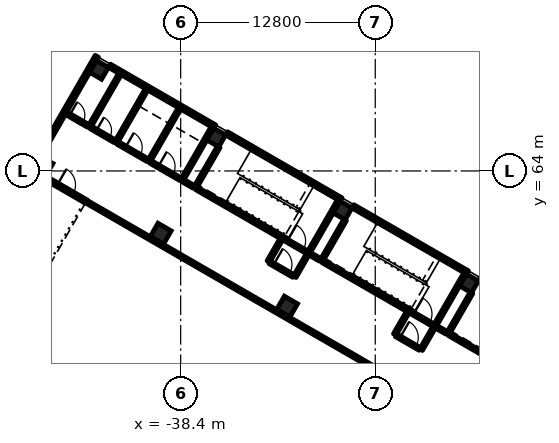
"""IFC4 building model, lengths in metres.
Left out: names, types, materials, properties, quantities, classifications, styles, units other than length and angle.
Written with IfcOpenShell. Run it as: python <this file> out.ifc"""

import sys

from ifc_helpers import new_model, si_unit, direction, frame, frame_2d, origin, origin_2d, place, context, subcontext, project, spatial, rectangle, extrude, element, fill, save


model = new_model("IFC4")
c1 = context("Model", 3, precision=1e-05, world=origin(), true_north=direction((0.0, 1.0)))
c2 = subcontext(c1, "Body", "Model", "MODEL_VIEW")
j1 = project(units=[si_unit("LENGTHUNIT", "METRE"), si_unit("PLANEANGLEUNIT", "RADIAN")], contexts=[c1])
p1 = place(None, origin())
s1 = spatial("IfcSite", under=j1, at=p1, CompositionType="ELEMENT")
p2 = place(p1, origin())
s2 = spatial("IfcBuilding", under=s1, at=p2, CompositionType="ELEMENT")
p3 = place(p2, frame((0.0, 0.0, 6.0)))
s3 = spatial("IfcBuildingStorey", under=s2, at=p3, CompositionType="ELEMENT", Elevation=6.0)
for number, where, z_axis, x_axis in (
    (1, (-19.432, 56.599, 0.0), (0.0, 0.0, 1.0), (-0.5, -0.866, 0.0)),
    (2, (-27.746, 61.399, 0.0), (0.0, 0.0, 1.0), (-0.5, -0.866, 0.0)),
    (3, (-36.06, 66.199, 0.0), (0.0, 0.0, 1.0), (-0.5, -0.866, 0.0)),
    (4, (-43.767, 70.649, 0.0), (0.0, 0.0, 1.0), (-0.5, -0.866, 0.0)),
):
    element("IfcColumn", number, at=place(p3, frame(where, z_axis=z_axis, x_axis=x_axis)), inside=s3, PredefinedType="COLUMN", context=c2, shape_type="SweptSolid", body=[
        extrude(rectangle(XDim=0.9, YDim=0.9, at=origin_2d()), origin(), (0.0, 0.0, 1.0), 5.4),
    ])
for number, where, z_axis, x_axis in (
    (5, (-31.396, 55.077, 0.0), (0.0, 0.0, 1.0), (-0.5, -0.866, 0.0)),
    (6, (-39.71, 59.877, 0.0), (0.0, 0.0, 1.0), (-0.5, -0.866, 0.0)),
):
    element("IfcColumn", number, at=place(p3, frame(where, z_axis=z_axis, x_axis=x_axis)), inside=s3, PredefinedType="COLUMN", context=c2, shape_type="SweptSolid", body=[
        extrude(rectangle(XDim=1.0, YDim=1.0, at=origin_2d()), origin(), (0.0, 0.0, 1.0), 5.4),
    ])
p4 = place(p3, frame((-47.417, 64.327, 0.0), z_axis=(0.0, 0.0, 1.0), x_axis=(-0.5, -0.866025403784, 0.0)))
e7 = element("IfcColumn", 7, at=p4, inside=s3, PredefinedType="COLUMN", context=c2, shape_type="SweptSolid", body=[
    extrude(rectangle(XDim=0.9, YDim=0.9, at=origin_2d()), origin(), (0.0, 0.0, 1.0), 5.4),
])
p5 = place(p3, frame((-49.071, 62.612, 0.0), z_axis=(0.0, 0.0, 1.0), x_axis=(0.500001855621, 0.866024332438, 0.0)))
e8 = element("IfcWall", 8, at=p5, inside=s3, PredefinedType="SOLIDWALL", context=c2, shape_type="SweptSolid", body=[
    extrude(rectangle(XDim=10.312, YDim=0.25, at=frame_2d((5.156, 0.0))), origin(), (0.0, 0.0, 1.0), 5.1),
])
p6 = place(p3, frame((-18.755, 56.872, 0.0), z_axis=(0.0, 0.0, 1.0), x_axis=(0.866027159341, -0.499996959274, 0.0)))
e9 = element("IfcWall", 9, at=p6, inside=s3, PredefinedType="SOLIDWALL", context=c2, shape_type="SweptSolid", body=[
    extrude(rectangle(XDim=11.625, YDim=0.25, at=frame_2d((5.812, 0.0))), origin(), (0.0, 0.0, 1.0), 5.1),
])
p7 = place(p3, frame((-27.069, 61.672, 0.0), z_axis=(0.0, 0.0, 1.0), x_axis=(0.866021068297, -0.500007509209, 0.0)))
e10 = element("IfcWall", 10, at=p7, inside=s3, PredefinedType="SOLIDWALL", context=c2, shape_type="SweptSolid", body=[
    extrude(rectangle(XDim=8.6, YDim=0.25, at=frame_2d((4.3, 0.0))), origin(), (0.0, 0.0, 1.0), 5.1),
])
p8 = place(p3, frame((-35.383, 66.472, 0.0), z_axis=(0.0, 0.0, 1.0), x_axis=(0.866028165386, -0.499995216735, 0.0)))
e11 = element("IfcWall", 11, at=p8, inside=s3, PredefinedType="SOLIDWALL", context=c2, shape_type="SweptSolid", body=[
    extrude(rectangle(XDim=8.6, YDim=0.25, at=frame_2d((4.3, 0.0))), origin(), (0.0, 0.0, 1.0), 5.1),
])
p9 = place(p3, frame((-43.09, 70.922, 0.0), z_axis=(0.0, 0.0, 1.0), x_axis=(0.866026562566, -0.499997992926, 0.0)))
e12 = element("IfcWall", 12, at=p9, inside=s3, PredefinedType="SOLIDWALL", context=c2, shape_type="SweptSolid", body=[
    extrude(rectangle(XDim=7.9, YDim=0.25, at=frame_2d((3.95, 0.0))), origin(), (0.0, 0.0, 1.0), 5.1),
])
p10 = place(p3, frame((-19.621, 57.372, 0.0), z_axis=(0.0, 0.0, 1.0), x_axis=(0.867038199201, -0.4982416694, 0.0)))
e13 = element("IfcWall", 13, at=p10, inside=s3, PredefinedType="SOLIDWALL", context=c2, shape_type="SweptSolid", body=[
    extrude(rectangle(XDim=0.1, YDim=0.25, at=frame_2d((0.05, 0.0))), origin(), (0.0, 0.0, 1.0), 5.1),
])
for number, where, z_axis, x_axis in (
    (14, (-27.935, 62.172, 0.0), (0.0, 0.0, 1.0), (0.866, -0.5, 0.0)),
    (15, (-36.249, 66.972, 0.0), (0.0, 0.0, 1.0), (0.866, -0.5, 0.0)),
):
    element("IfcWall", number, at=place(p3, frame(where, z_axis=z_axis, x_axis=x_axis)), inside=s3, PredefinedType="SOLIDWALL", context=c2, shape_type="SweptSolid", body=[
        extrude(rectangle(XDim=0.1, YDim=0.25, at=frame_2d((0.05, 0.0))), origin(), (0.0, 0.0, 1.0), 5.1),
    ])
p11 = place(p3, frame((-19.267, 55.984, 0.0), z_axis=(0.0, 0.0, 1.0), x_axis=(-0.49999285859, -0.86602952684, 0.0)))
e16 = element("IfcWall", 16, at=p11, inside=s3, PredefinedType="SOLIDWALL", context=c2, shape_type="SweptSolid", body=[
    extrude(rectangle(XDim=3.1, YDim=0.2, at=frame_2d((1.55, 0.0))), origin(), (0.0, 0.0, 1.0), 5.1),
])
p12 = place(p3, frame((-19.683, 57.263, 0.0), z_axis=(0.0, 0.0, 1.0), x_axis=(-0.49999894854, -0.866026010844, 0.0)))
e17 = element("IfcWall", 17, at=p12, inside=s3, PredefinedType="SOLIDWALL", context=c2, shape_type="SweptSolid", body=[
    extrude(rectangle(XDim=4.0, YDim=0.2, at=frame_2d((2.0, 0.0))), origin(), (0.0, 0.0, 1.0), 5.1),
])
p13 = place(p3, frame((-27.581, 60.784, 0.0), z_axis=(0.0, 0.0, 1.0), x_axis=(-0.49999285859, -0.86602952684, 0.0)))
e18 = element("IfcWall", 18, at=p13, inside=s3, PredefinedType="SOLIDWALL", context=c2, shape_type="SweptSolid", body=[
    extrude(rectangle(XDim=3.1, YDim=0.2, at=frame_2d((1.55, 0.0))), origin(), (0.0, 0.0, 1.0), 5.1),
])
p14 = place(p3, frame((-27.997, 62.063, 0.0), z_axis=(0.0, 0.0, 1.0), x_axis=(-0.49999894854, -0.866026010844, 0.0)))
e19 = element("IfcWall", 19, at=p14, inside=s3, PredefinedType="SOLIDWALL", context=c2, shape_type="SweptSolid", body=[
    extrude(rectangle(XDim=4.0, YDim=0.2, at=frame_2d((2.0, 0.0))), origin(), (0.0, 0.0, 1.0), 5.1),
])
p15 = place(p3, frame((-35.895, 65.584, 0.0), z_axis=(0.0, 0.0, 1.0), x_axis=(-0.500026960575, -0.86600983753, 0.0)))
e20 = element("IfcWall", 20, at=p15, inside=s3, PredefinedType="SOLIDWALL", context=c2, shape_type="SweptSolid", body=[
    extrude(rectangle(XDim=3.1, YDim=0.2, at=frame_2d((1.55, 0.0))), origin(), (0.0, 0.0, 1.0), 5.1),
])
p16 = place(p3, frame((-14.972, 49.924, 0.0), z_axis=(0.0, 0.0, 1.0), x_axis=(-0.86601134256, 0.500024353964, 0.0)))
e21 = element("IfcWall", 21, at=p16, inside=s3, PredefinedType="SOLIDWALL", context=c2, shape_type="SweptSolid", body=[
    extrude(rectangle(XDim=6.65, YDim=0.2, at=frame_2d((3.325, 0.0))), origin(), (0.0, 0.0, 1.0), 5.1),
])
p17 = place(p3, frame((-23.285, 54.724, 0.0), z_axis=(0.0, 0.0, 1.0), x_axis=(0.866002029911, -0.500040482552, 0.0)))
e22 = element("IfcWall", 22, at=p17, inside=s3, PredefinedType="SOLIDWALL", context=c2, shape_type="SweptSolid", body=[
    extrude(rectangle(XDim=1.75, YDim=0.2, at=frame_2d((0.875, 0.0))), origin(), (0.0, 0.0, 1.0), 5.1),
])
p18 = place(p17, frame((0.25, 0.0, 0.0)))
e23 = element("IfcOpeningElement", 23, at=p18, cuts=e22, PredefinedType="OPENING", context=c2, shape_type="SweptSolid", body=[
    extrude(rectangle(XDim=1.2, YDim=2.1, at=frame_2d((0.6, 1.05))), frame((0.0, 0.11, 0.0), z_axis=(0.0, -1.0, 0.0), x_axis=(1.0, 0.0, 0.0)), (0.0, 0.0, 1.0), 0.22),
])
p19 = place(p3, frame((-23.285, 54.724, 0.0), z_axis=(0.0, 0.0, 1.0), x_axis=(-0.866027239912, 0.49999681972, 0.0)))
e24 = element("IfcWall", 24, at=p19, inside=s3, PredefinedType="SOLIDWALL", context=c2, shape_type="SweptSolid", body=[
    extrude(rectangle(XDim=6.65, YDim=0.2, at=frame_2d((3.325, 0.0))), origin(), (0.0, 0.0, 1.0), 5.1),
])
p20 = place(p3, frame((-31.599, 59.524, 0.0), z_axis=(0.0, 0.0, 1.0), x_axis=(0.866036909293, -0.499980071345, 0.0)))
e25 = element("IfcWall", 25, at=p20, inside=s3, PredefinedType="SOLIDWALL", context=c2, shape_type="SweptSolid", body=[
    extrude(rectangle(XDim=1.75, YDim=0.2, at=frame_2d((0.875, 0.0))), origin(), (0.0, 0.0, 1.0), 5.1),
])
p21 = place(p20, frame((0.25, 0.0, 0.0)))
e26 = element("IfcOpeningElement", 26, at=p21, cuts=e25, PredefinedType="OPENING", context=c2, shape_type="SweptSolid", body=[
    extrude(rectangle(XDim=1.2, YDim=2.1, at=frame_2d((0.6, 1.05))), frame((0.0, 0.11, 0.0), z_axis=(0.0, -1.0, 0.0), x_axis=(1.0, 0.0, 0.0)), (0.0, 0.0, 1.0), 0.22),
])
p22 = place(p3, frame((-31.599, 59.524, 0.0), z_axis=(0.0, 0.0, 1.0), x_axis=(-0.866027239912, 0.49999681972, 0.0)))
e27 = element("IfcWall", 27, at=p22, inside=s3, PredefinedType="SOLIDWALL", context=c2, shape_type="SweptSolid", body=[
    extrude(rectangle(XDim=6.65, YDim=0.2, at=frame_2d((3.325, 0.0))), origin(), (0.0, 0.0, 1.0), 5.1),
])
for number, where, z_axis, x_axis in (
    (28, (-36.311, 66.864, 0.0), (0.0, 0.0, 1.0), (-0.5, -0.866, 0.0)),
    (29, (-38.476, 68.114, 0.0), (0.0, 0.0, 1.0), (-0.5, -0.866, 0.0)),
    (30, (-40.641, 69.364, 0.0), (0.0, 0.0, 1.0), (-0.5, -0.866, 0.0)),
):
    element("IfcWall", number, at=place(p3, frame(where, z_axis=z_axis, x_axis=x_axis)), inside=s3, PredefinedType="SOLIDWALL", context=c2, shape_type="SweptSolid", body=[
        extrude(rectangle(XDim=4.0, YDim=0.2, at=frame_2d((2.0, 0.0))), origin(), (0.0, 0.0, 1.0), 5.1),
    ])
p23 = place(p3, frame((-40.389, 64.599, 0.0), z_axis=(0.0, 0.0, 1.0), x_axis=(0.86602648383, -0.499998129301, 0.0)))
e31 = element("IfcWall", 31, at=p23, inside=s3, PredefinedType="SOLIDWALL", context=c2, shape_type="SweptSolid", body=[
    extrude(rectangle(XDim=2.3, YDim=0.2, at=frame_2d((1.15, 0.0))), origin(), (0.0, 0.0, 1.0), 5.1),
])
p24 = place(p23, frame((0.6, 0.0, 0.0)))
e32 = element("IfcOpeningElement", 32, at=p24, cuts=e31, PredefinedType="OPENING", context=c2, shape_type="SweptSolid", body=[
    extrude(rectangle(XDim=1.1, YDim=2.1, at=frame_2d((0.55, 1.05))), frame((0.0, 0.11, 0.0), z_axis=(0.0, -1.0, 0.0), x_axis=(1.0, 0.0, 0.0)), (0.0, 0.0, 1.0), 0.22),
])
p25 = place(p3, frame((-42.554, 65.849, 0.0), z_axis=(0.0, 0.0, 1.0), x_axis=(0.86602648383, -0.499998129301, 0.0)))
e33 = element("IfcWall", 33, at=p25, inside=s3, PredefinedType="SOLIDWALL", context=c2, shape_type="SweptSolid", body=[
    extrude(rectangle(XDim=2.3, YDim=0.2, at=frame_2d((1.15, 0.0))), origin(), (0.0, 0.0, 1.0), 5.1),
])
p26 = place(p25, frame((0.6, 0.0, 0.0)))
e34 = element("IfcOpeningElement", 34, at=p26, cuts=e33, PredefinedType="OPENING", context=c2, shape_type="SweptSolid", body=[
    extrude(rectangle(XDim=1.1, YDim=2.1, at=frame_2d((0.55, 1.05))), frame((0.0, 0.11, 0.0), z_axis=(0.0, -1.0, 0.0), x_axis=(1.0, 0.0, 0.0)), (0.0, 0.0, 1.0), 0.22),
])
p27 = place(p3, frame((-21.733, 53.713, 0.0), z_axis=(0.0, 0.0, 1.0), x_axis=(-0.499892348375, -0.866087547558, 0.0)))
e35 = element("IfcWall", 35, at=p27, inside=s3, PredefinedType="PARTITIONING", context=c2, shape_type="SweptSolid", body=[
    extrude(rectangle(XDim=1.7, YDim=0.2, at=frame_2d((0.85, 0.0))), origin(), (0.0, 0.0, 1.0), 4.5),
])
p28 = place(p3, frame((-23.465, 54.713, 0.0), z_axis=(0.0, 0.0, 1.0), x_axis=(-0.500000056704, -0.866025371046, 0.0)))
e36 = element("IfcWall", 36, at=p28, inside=s3, PredefinedType="PARTITIONING", context=c2, shape_type="SweptSolid", body=[
    extrude(rectangle(XDim=1.7, YDim=0.2, at=frame_2d((0.85, 0.0))), origin(), (0.0, 0.0, 1.0), 4.5),
])
for number, where, z_axis, x_axis in (
    (37, (-30.047, 58.513, 0.0), (0.0, 0.0, 1.0), (-0.5, -0.866, 0.0)),
    (38, (-31.779, 59.513, 0.0), (0.0, 0.0, 1.0), (-0.5, -0.866, 0.0)),
):
    element("IfcWall", number, at=place(p3, frame(where, z_axis=z_axis, x_axis=x_axis)), inside=s3, PredefinedType="PARTITIONING", context=c2, shape_type="SweptSolid", body=[
        extrude(rectangle(XDim=1.7, YDim=0.2, at=frame_2d((0.85, 0.0))), origin(), (0.0, 0.0, 1.0), 4.5),
    ])
p29 = place(p3, frame((-24.229, 53.19, 0.0), z_axis=(0.0, 0.0, 1.0), x_axis=(0.866047807691, -0.499961193289, 0.0)))
e39 = element("IfcWall", 39, at=p29, inside=s3, PredefinedType="PARTITIONING", context=c2, shape_type="SweptSolid", body=[
    extrude(rectangle(XDim=1.8, YDim=0.2, at=frame_2d((0.9, 0.0))), origin(), (0.0, 0.0, 1.0), 4.5),
])
p30 = place(p29, frame((0.3, 0.0, 0.0)))
e40 = element("IfcOpeningElement", 40, at=p30, cuts=e39, PredefinedType="OPENING", context=c2, shape_type="SweptSolid", body=[
    extrude(rectangle(XDim=1.2, YDim=2.1, at=frame_2d((0.6, 1.05))), frame((0.0, 0.11, 0.0), z_axis=(0.0, -1.0, 0.0), x_axis=(1.0, 0.0, 0.0)), (0.0, 0.0, 1.0), 0.22),
])
p31 = place(p3, frame((-32.542, 57.99, 0.0), z_axis=(0.0, 0.0, 1.0), x_axis=(0.866047807691, -0.499961193289, 0.0)))
e41 = element("IfcWall", 41, at=p31, inside=s3, PredefinedType="PARTITIONING", context=c2, shape_type="SweptSolid", body=[
    extrude(rectangle(XDim=1.8, YDim=0.2, at=frame_2d((0.9, 0.0))), origin(), (0.0, 0.0, 1.0), 4.5),
])
p32 = place(p31, frame((0.3, 0.0, 0.0)))
e42 = element("IfcOpeningElement", 42, at=p32, cuts=e41, PredefinedType="OPENING", context=c2, shape_type="SweptSolid", body=[
    extrude(rectangle(XDim=1.2, YDim=2.1, at=frame_2d((0.6, 1.05))), frame((0.0, 0.11, 0.0), z_axis=(0.0, -1.0, 0.0), x_axis=(1.0, 0.0, 0.0)), (0.0, 0.0, 1.0), 0.22),
])
p33 = place(p3, frame((-46.734, 63.21, 0.0), z_axis=(0.0, 0.0, 1.0), x_axis=(0.866057815567, -0.499943856944, 0.0)))
e43 = element("IfcWall", 43, at=p33, inside=s3, PredefinedType="SOLIDWALL", context=c2, shape_type="SweptSolid", body=[
    extrude(rectangle(XDim=2.45, YDim=0.25, at=frame_2d((1.225, 0.0))), origin(), (0.0, 0.0, 1.0), 4.5),
])
p34 = place(p33, frame((0.25, 0.0, 0.0)))
e44 = element("IfcOpeningElement", 44, at=p34, cuts=e43, PredefinedType="OPENING", context=c2, shape_type="SweptSolid", body=[
    extrude(rectangle(XDim=1.2, YDim=2.1, at=frame_2d((0.6, 1.05))), frame((0.0, 0.135, 0.0), z_axis=(0.0, -1.0, 0.0), x_axis=(1.0, 0.0, 0.0)), (0.0, 0.0, 1.0), 0.27),
])
p35 = place(p3, frame((-46.734, 63.21, 0.0), z_axis=(0.0, 0.0, 1.0), x_axis=(-0.865989903783, 0.500061482766, 0.0)))
e45 = element("IfcWall", 45, at=p35, inside=s3, PredefinedType="SOLIDWALL", context=c2, shape_type="SweptSolid", body=[
    extrude(rectangle(XDim=1.6, YDim=0.25, at=frame_2d((0.8, 0.0))), origin(), (0.0, 0.0, 1.0), 4.5),
])
p36 = place(p3, frame((-42.395, 70.376, 0.0), z_axis=(0.0, 0.0, 1.0), x_axis=(-0.49999894854, -0.866026010844, 0.0)))
e46 = element("IfcWall", 46, at=p36, inside=s3, PredefinedType="PARTITIONING", context=c2, shape_type="SweptSolid", body=[
    extrude(rectangle(XDim=4.0, YDim=0.2, at=frame_2d((2.0, 0.0))), origin(), (0.0, 0.0, 1.0), 4.5),
])
p37 = place(p3, frame((-44.308, 66.862, 0.0), z_axis=(0.0, 0.0, 1.0), x_axis=(0.866036312054, -0.499981105847, 0.0)))
e47 = element("IfcWall", 47, at=p37, inside=s3, PredefinedType="PARTITIONING", context=c2, shape_type="SweptSolid", body=[
    extrude(rectangle(XDim=1.825, YDim=0.2, at=frame_2d((0.912, 0.0))), origin(), (0.0, 0.0, 1.0), 4.5),
])
p38 = place(p37, frame((0.413, 0.0, 0.0)))
e48 = element("IfcOpeningElement", 48, at=p38, cuts=e47, PredefinedType="OPENING", context=c2, shape_type="SweptSolid", body=[
    extrude(rectangle(XDim=1.0, YDim=2.1, at=frame_2d((0.5, 1.05))), frame((0.0, 0.11, 0.0), z_axis=(0.0, -1.0, 0.0), x_axis=(1.0, 0.0, 0.0)), (0.0, 0.0, 1.0), 0.22),
])
p39 = place(p3, frame((-45.932, 67.799, 0.0), z_axis=(0.0, 0.0, 1.0), x_axis=(0.866027799164, -0.499995851058, 0.0)))
e49 = element("IfcWall", 49, at=p39, inside=s3, PredefinedType="PARTITIONING", context=c2, shape_type="SweptSolid", body=[
    extrude(rectangle(XDim=1.675, YDim=0.2, at=frame_2d((0.837, 0.0))), origin(), (0.0, 0.0, 1.0), 4.5),
])
p40 = place(p39, frame((0.262, 0.0, 0.0)))
e50 = element("IfcOpeningElement", 50, at=p40, cuts=e49, PredefinedType="OPENING", context=c2, shape_type="SweptSolid", body=[
    extrude(rectangle(XDim=1.0, YDim=2.1, at=frame_2d((0.5, 1.05))), frame((0.0, 0.11, 0.0), z_axis=(0.0, -1.0, 0.0), x_axis=(1.0, 0.0, 0.0)), (0.0, 0.0, 1.0), 0.22),
])
p41 = place(p3, frame((-20.904, 53.349, 0.0), z_axis=(0.0, 0.0, 1.0), x_axis=(-0.865961984968, 0.500109828528, 0.0)))
e51 = element("IfcWall", 51, at=p41, inside=s3, PredefinedType="PARTITIONING", context=c2, shape_type="SweptSolid", body=[
    extrude(rectangle(XDim=0.8, YDim=0.2, at=frame_2d((0.4, 0.0))), origin(), (0.0, 0.0, 1.0), 4.5),
])
p42 = place(p3, frame((-29.218, 58.149, 0.0), z_axis=(0.0, 0.0, 1.0), x_axis=(-0.866017831539, 0.500013115284, 0.0)))
e52 = element("IfcWall", 52, at=p42, inside=s3, PredefinedType="PARTITIONING", context=c2, shape_type="SweptSolid", body=[
    extrude(rectangle(XDim=0.8, YDim=0.2, at=frame_2d((0.4, 0.0))), origin(), (0.0, 0.0, 1.0), 4.5),
])
p43 = place(p3, frame((-37.531, 62.949, 0.0), z_axis=(0.0, 0.0, 1.0), x_axis=(-0.866094119867, 0.499880961361, 0.0)))
e53 = element("IfcWall", 53, at=p43, inside=s3, PredefinedType="PARTITIONING", context=c2, shape_type="SweptSolid", body=[
    extrude(rectangle(XDim=0.8, YDim=0.2, at=frame_2d((0.4, 0.0))), origin(), (0.0, 0.0, 1.0), 4.5),
])
p44 = place(p3, frame((-10.491, 42.285, 0.0), z_axis=(0.0, 0.0, 1.0), x_axis=(-0.866022857395, 0.50000441045, 0.0)))
e54 = element("IfcWall", 54, at=p44, inside=s3, PredefinedType="PARTITIONING", context=c2, shape_type="SweptSolid", body=[
    extrude(rectangle(XDim=39.4, YDim=0.2, at=frame_2d((19.7, 0.0))), origin(), (0.0, 0.0, 1.0), 4.5),
])
p45 = place(p18, origin())
e55 = element("IfcDoor", 55, at=p45, inside=s3, OperationType="SINGLE_SWING_LEFT", PredefinedType="DOOR", context=c2, shape_type="SweptSolid", body=[
    extrude(rectangle(XDim=1.2, YDim=2.1, at=frame_2d((0.6, 1.05))), frame((0.0, 0.025, 0.0), z_axis=(0.0, -1.0, 0.0), x_axis=(1.0, 0.0, 0.0)), (0.0, 0.0, 1.0), 0.05),
])
fill(e23, e55)
p46 = place(p21, origin())
e56 = element("IfcDoor", 56, at=p46, inside=s3, OperationType="SINGLE_SWING_LEFT", PredefinedType="DOOR", context=c2, shape_type="SweptSolid", body=[
    extrude(rectangle(XDim=1.2, YDim=2.1, at=frame_2d((0.6, 1.05))), frame((0.0, 0.025, 0.0), z_axis=(0.0, -1.0, 0.0), x_axis=(1.0, 0.0, 0.0)), (0.0, 0.0, 1.0), 0.05),
])
fill(e26, e56)
p47 = place(p24, origin())
e57 = element("IfcDoor", 57, at=p47, inside=s3, OperationType="DOUBLE_DOOR_SLIDING", PredefinedType="DOOR", context=c2, shape_type="SweptSolid", body=[
    extrude(rectangle(XDim=1.1, YDim=2.1, at=frame_2d((0.55, 1.05))), frame((0.0, 0.025, 0.0), z_axis=(0.0, -1.0, 0.0), x_axis=(1.0, 0.0, 0.0)), (0.0, 0.0, 1.0), 0.05),
])
fill(e32, e57)
p48 = place(p26, origin())
e58 = element("IfcDoor", 58, at=p48, inside=s3, OperationType="DOUBLE_DOOR_SLIDING", PredefinedType="DOOR", context=c2, shape_type="SweptSolid", body=[
    extrude(rectangle(XDim=1.1, YDim=2.1, at=frame_2d((0.55, 1.05))), frame((0.0, 0.025, 0.0), z_axis=(0.0, -1.0, 0.0), x_axis=(1.0, 0.0, 0.0)), (0.0, 0.0, 1.0), 0.05),
])
fill(e34, e58)
p49 = place(p30, origin())
e59 = element("IfcDoor", 59, at=p49, inside=s3, OperationType="SINGLE_SWING_LEFT", PredefinedType="DOOR", context=c2, shape_type="SweptSolid", body=[
    extrude(rectangle(XDim=1.2, YDim=2.1, at=frame_2d((0.6, 1.05))), frame((0.0, 0.025, 0.0), z_axis=(0.0, -1.0, 0.0), x_axis=(1.0, 0.0, 0.0)), (0.0, 0.0, 1.0), 0.05),
])
fill(e40, e59)
p50 = place(p32, origin())
e60 = element("IfcDoor", 60, at=p50, inside=s3, OperationType="SINGLE_SWING_LEFT", PredefinedType="DOOR", context=c2, shape_type="SweptSolid", body=[
    extrude(rectangle(XDim=1.2, YDim=2.1, at=frame_2d((0.6, 1.05))), frame((0.0, 0.025, 0.0), z_axis=(0.0, -1.0, 0.0), x_axis=(1.0, 0.0, 0.0)), (0.0, 0.0, 1.0), 0.05),
])
fill(e42, e60)
p51 = place(p34, origin())
e61 = element("IfcDoor", 61, at=p51, inside=s3, OperationType="SINGLE_SWING_LEFT", PredefinedType="DOOR", context=c2, shape_type="SweptSolid", body=[
    extrude(rectangle(XDim=1.2, YDim=2.1, at=frame_2d((0.6, 1.05))), frame((0.0, 0.025, 0.0), z_axis=(0.0, -1.0, 0.0), x_axis=(1.0, 0.0, 0.0)), (0.0, 0.0, 1.0), 0.05),
])
fill(e44, e61)
p52 = place(p38, origin())
e62 = element("IfcDoor", 62, at=p52, inside=s3, OperationType="SINGLE_SWING_LEFT", PredefinedType="DOOR", context=c2, shape_type="SweptSolid", body=[
    extrude(rectangle(XDim=1.0, YDim=2.1, at=frame_2d((0.5, 1.05))), frame((0.0, 0.025, 0.0), z_axis=(0.0, -1.0, 0.0), x_axis=(1.0, 0.0, 0.0)), (0.0, 0.0, 1.0), 0.05),
])
fill(e48, e62)
p53 = place(p40, origin())
e63 = element("IfcDoor", 63, at=p53, inside=s3, OperationType="SINGLE_SWING_LEFT", PredefinedType="DOOR", context=c2, shape_type="SweptSolid", body=[
    extrude(rectangle(XDim=1.0, YDim=2.1, at=frame_2d((0.5, 1.05))), frame((0.0, 0.025, 0.0), z_axis=(0.0, -1.0, 0.0), x_axis=(1.0, 0.0, 0.0)), (0.0, 0.0, 1.0), 0.05),
])
fill(e50, e63)
save(model, sys.argv[1])
